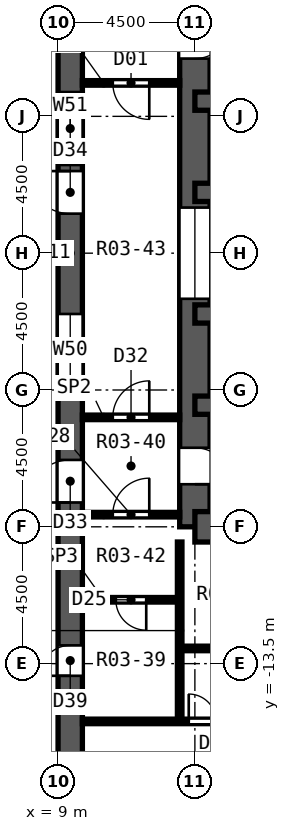
"""IFC4 building model, lengths in metres.
Left out: names, types, materials, properties, quantities, classifications, styles, units other than length and angle.
Written with IfcOpenShell. Run it as: python <this file> out.ifc"""

import sys

from ifc_helpers import new_model, si_unit, direction, frame, frame_2d, origin, place, context, subcontext, project, spatial, rectangle, extrude, element, fill, save


model = new_model("IFC4")
c1 = context("Model", 3, precision=1e-05, world=origin(), true_north=direction((0.0, 1.0)))
c2 = subcontext(c1, "Body", "Model", "MODEL_VIEW")
j1 = project(units=[si_unit("LENGTHUNIT", "METRE"), si_unit("PLANEANGLEUNIT", "RADIAN")], contexts=[c1])
p1 = place(None, origin())
s1 = spatial("IfcSite", under=j1, at=p1, CompositionType="ELEMENT")
p2 = place(p1, origin())
s2 = spatial("IfcBuilding", under=s1, at=p2, CompositionType="ELEMENT")
p3 = place(p2, origin())
s3 = spatial("IfcBuildingStorey", under=s2, at=p3, CompositionType="ELEMENT", Elevation=0.0)
p4 = place(p3, frame((13.5, -9.0, 0.0), z_axis=(0.0, 0.0, 1.0), x_axis=(0.0, 1.0, 0.0)))
e1 = element("IfcWall", 1, at=p4, inside=s3, PredefinedType="SHEAR", context=c2, shape_type="SweptSolid", body=[
    extrude(rectangle(XDim=18.0, YDim=1.0, at=frame_2d((9.0, 0.0))), origin(), (0.0, 0.0, 1.0), 5.0),
])
p5 = place(p4, frame((15.4, 0.0, 0.0)))
e2 = element("IfcOpeningElement", 2, at=p5, cuts=e1, PredefinedType="OPENING", context=c2, shape_type="SweptSolid", body=[
    extrude(rectangle(XDim=1.2, YDim=2.1, at=frame_2d((0.6, 1.05))), frame((0.0, 0.512, 0.0), z_axis=(0.0, -1.0, 0.0), x_axis=(1.0, 0.0, 0.0)), (0.0, 0.0, 1.0), 1.024),
])
p6 = place(p4, frame((1.4, 0.0, 0.0)))
e3 = element("IfcOpeningElement", 3, at=p6, cuts=e1, PredefinedType="OPENING", context=c2, shape_type="SweptSolid", body=[
    extrude(rectangle(XDim=1.2, YDim=2.1, at=frame_2d((0.6, 1.05))), frame((0.0, 0.512, 0.0), z_axis=(0.0, -1.0, 0.0), x_axis=(1.0, 0.0, 0.0)), (0.0, 0.0, 1.0), 1.024),
])
p7 = place(p4, frame((7.5, 0.0, 0.0)))
e4 = element("IfcOpeningElement", 4, at=p7, cuts=e1, PredefinedType="OPENING", context=c2, shape_type="SweptSolid", body=[
    extrude(rectangle(XDim=3.0, YDim=2.4, at=frame_2d((1.5, 1.2))), frame((0.0, 0.512, 0.0), z_axis=(0.0, -1.0, 0.0), x_axis=(1.0, 0.0, 0.0)), (0.0, 0.0, 1.0), 1.024),
])
p8 = place(p3, frame((13.5, -9.0, 0.0), z_axis=(0.0, 0.0, 1.0), x_axis=(1.0, 0.0, 0.0)))
e5 = element("IfcWall", 5, at=p8, inside=s3, PredefinedType="SHEAR", context=c2, shape_type="SweptSolid", body=[
    extrude(rectangle(XDim=12.4, YDim=1.0, at=frame_2d((6.2, 0.0))), origin(), (0.0, 0.0, 1.0), 5.0),
])
p9 = place(p3, frame((13.5, 5.0, 0.0), z_axis=(0.0, 0.0, 1.0), x_axis=(1.0, 0.0, 0.0)))
e6 = element("IfcWall", 6, at=p9, inside=s3, PredefinedType="SHEAR", context=c2, shape_type="SweptSolid", body=[
    extrude(rectangle(XDim=12.4, YDim=0.6, at=frame_2d((6.2, 0.0))), origin(), (0.0, 0.0, 1.0), 5.0),
])
p10 = place(p9, frame((9.74, 0.0, 0.0)))
e7 = element("IfcOpeningElement", 7, at=p10, cuts=e6, PredefinedType="OPENING", context=c2, shape_type="SweptSolid", body=[
    extrude(rectangle(XDim=0.9, YDim=2.1, at=frame_2d((0.45, 1.05))), frame((0.0, 0.312, 0.0), z_axis=(0.0, -1.0, 0.0), x_axis=(1.0, 0.0, 0.0)), (0.0, 0.0, 1.0), 0.624),
])
p11 = place(p3, frame((13.5, -5.0, 0.0), z_axis=(0.0, 0.0, 1.0), x_axis=(1.0, 0.0, 0.0)))
e8 = element("IfcWall", 8, at=p11, inside=s3, PredefinedType="SHEAR", context=c2, shape_type="SweptSolid", body=[
    extrude(rectangle(XDim=12.4, YDim=0.6, at=frame_2d((6.2, 0.0))), origin(), (0.0, 0.0, 1.0), 5.0),
])
p12 = place(p11, frame((9.74, 0.0, 0.0)))
e9 = element("IfcOpeningElement", 9, at=p12, cuts=e8, PredefinedType="OPENING", context=c2, shape_type="SweptSolid", body=[
    extrude(rectangle(XDim=0.9, YDim=2.1, at=frame_2d((0.45, 1.05))), frame((0.0, 0.312, 0.0), z_axis=(0.0, -1.0, 0.0), x_axis=(1.0, 0.0, 0.0)), (0.0, 0.0, 1.0), 0.624),
])
p13 = place(p11, frame((0.6, 0.0, 0.0)))
e10 = element("IfcOpeningElement", 10, at=p13, cuts=e8, PredefinedType="OPENING", context=c2, shape_type="SweptSolid", body=[
    extrude(rectangle(XDim=1.1, YDim=2.1, at=frame_2d((0.55, 1.05))), frame((0.0, 0.312, 0.0), z_axis=(0.0, -1.0, 0.0), x_axis=(1.0, 0.0, 0.0)), (0.0, 0.0, 1.0), 0.624),
])
p14 = place(p3, frame((13.5, 2.0, 0.0), z_axis=(0.0, 0.0, 1.0), x_axis=(1.0, 0.0, 0.0)))
e11 = element("IfcWall", 11, at=p14, inside=s3, PredefinedType="SHEAR", context=c2, shape_type="SweptSolid", body=[
    extrude(rectangle(XDim=12.4, YDim=0.6, at=frame_2d((6.2, 0.0))), origin(), (0.0, 0.0, 1.0), 5.0),
])
p15 = place(p14, frame((7.65, 0.0, 0.0)))
e12 = element("IfcOpeningElement", 12, at=p15, cuts=e11, PredefinedType="OPENING", context=c2, shape_type="SweptSolid", body=[
    extrude(rectangle(XDim=1.1, YDim=2.1, at=frame_2d((0.55, 1.05))), frame((0.0, 0.312, 0.0), z_axis=(0.0, -1.0, 0.0), x_axis=(1.0, 0.0, 0.0)), (0.0, 0.0, 1.0), 0.624),
])
p16 = place(p14, frame((2.341, 0.0, 0.0)))
e13 = element("IfcOpeningElement", 13, at=p16, cuts=e11, PredefinedType="OPENING", context=c2, shape_type="SweptSolid", body=[
    extrude(rectangle(XDim=0.9, YDim=2.1, at=frame_2d((0.45, 1.05))), frame((0.0, 0.312, 0.0), z_axis=(0.0, -1.0, 0.0), x_axis=(1.0, 0.0, 0.0)), (0.0, 0.0, 1.0), 0.624),
])
p17 = place(p14, frame((5.761, 0.0, 0.0)))
e14 = element("IfcOpeningElement", 14, at=p17, cuts=e11, PredefinedType="OPENING", context=c2, shape_type="SweptSolid", body=[
    extrude(rectangle(XDim=0.9, YDim=2.1, at=frame_2d((0.45, 1.05))), frame((0.0, 0.312, 0.0), z_axis=(0.0, -1.0, 0.0), x_axis=(1.0, 0.0, 0.0)), (0.0, 0.0, 1.0), 0.624),
])
p18 = place(p14, frame((9.74, 0.0, 0.0)))
e15 = element("IfcOpeningElement", 15, at=p18, cuts=e11, PredefinedType="OPENING", context=c2, shape_type="SweptSolid", body=[
    extrude(rectangle(XDim=0.9, YDim=2.1, at=frame_2d((0.45, 1.05))), frame((0.0, 0.312, 0.0), z_axis=(0.0, -1.0, 0.0), x_axis=(1.0, 0.0, 0.0)), (0.0, 0.0, 1.0), 0.624),
])
p19 = place(p14, frame((10.88, 0.0, 0.0)))
e16 = element("IfcOpeningElement", 16, at=p19, cuts=e11, PredefinedType="OPENING", context=c2, shape_type="SweptSolid", body=[
    extrude(rectangle(XDim=0.9, YDim=2.1, at=frame_2d((0.45, 1.05))), frame((0.0, 0.312, 0.0), z_axis=(0.0, -1.0, 0.0), x_axis=(1.0, 0.0, 0.0)), (0.0, 0.0, 1.0), 0.624),
])
p20 = place(p3, frame((13.5, -2.0, 0.0), z_axis=(0.0, 0.0, 1.0), x_axis=(1.0, 0.0, 0.0)))
e17 = element("IfcWall", 17, at=p20, inside=s3, PredefinedType="SHEAR", context=c2, shape_type="SweptSolid", body=[
    extrude(rectangle(XDim=12.4, YDim=0.6, at=frame_2d((6.2, 0.0))), origin(), (0.0, 0.0, 1.0), 5.0),
])
p21 = place(p20, frame((5.62, 0.0, 0.0)))
e18 = element("IfcOpeningElement", 18, at=p21, cuts=e17, PredefinedType="OPENING", context=c2, shape_type="SweptSolid", body=[
    extrude(rectangle(XDim=1.1, YDim=2.1, at=frame_2d((0.55, 1.05))), frame((0.0, 0.312, 0.0), z_axis=(0.0, -1.0, 0.0), x_axis=(1.0, 0.0, 0.0)), (0.0, 0.0, 1.0), 0.624),
])
p22 = place(p20, frame((7.65, 0.0, 0.0)))
e19 = element("IfcOpeningElement", 19, at=p22, cuts=e17, PredefinedType="OPENING", context=c2, shape_type="SweptSolid", body=[
    extrude(rectangle(XDim=1.1, YDim=2.1, at=frame_2d((0.55, 1.05))), frame((0.0, 0.312, 0.0), z_axis=(0.0, -1.0, 0.0), x_axis=(1.0, 0.0, 0.0)), (0.0, 0.0, 1.0), 0.624),
])
p23 = place(p20, frame((1.265, 0.0, 0.0)))
e20 = element("IfcOpeningElement", 20, at=p23, cuts=e17, PredefinedType="OPENING", context=c2, shape_type="SweptSolid", body=[
    extrude(rectangle(XDim=1.0, YDim=2.1, at=frame_2d((0.5, 1.05))), frame((0.0, 0.312, 0.0), z_axis=(0.0, -1.0, 0.0), x_axis=(1.0, 0.0, 0.0)), (0.0, 0.0, 1.0), 0.624),
])
p24 = place(p20, frame((9.74, 0.0, 0.0)))
e21 = element("IfcOpeningElement", 21, at=p24, cuts=e17, PredefinedType="OPENING", context=c2, shape_type="SweptSolid", body=[
    extrude(rectangle(XDim=0.9, YDim=2.1, at=frame_2d((0.45, 1.05))), frame((0.0, 0.312, 0.0), z_axis=(0.0, -1.0, 0.0), x_axis=(1.0, 0.0, 0.0)), (0.0, 0.0, 1.0), 0.624),
])
p25 = place(p20, frame((10.88, 0.0, 0.0)))
e22 = element("IfcOpeningElement", 22, at=p25, cuts=e17, PredefinedType="OPENING", context=c2, shape_type="SweptSolid", body=[
    extrude(rectangle(XDim=0.9, YDim=2.1, at=frame_2d((0.45, 1.05))), frame((0.0, 0.312, 0.0), z_axis=(0.0, -1.0, 0.0), x_axis=(1.0, 0.0, 0.0)), (0.0, 0.0, 1.0), 0.624),
])
p26 = place(p3, frame((9.4, -27.077, 0.0), z_axis=(0.0, 0.0, 1.0), x_axis=(0.0, 1.0, 0.0)))
e23 = element("IfcWall", 23, at=p26, inside=s3, PredefinedType="SHEAR", context=c2, shape_type="SweptSolid", body=[
    extrude(rectangle(XDim=54.154, YDim=0.8, at=frame_2d((27.077, 0.0))), origin(), (0.0, 0.0, 1.0), 5.0),
])
p27 = place(p26, frame((18.877, 0.0, 0.0)))
e24 = element("IfcOpeningElement", 24, at=p27, cuts=e23, PredefinedType="OPENING", context=c2, shape_type="SweptSolid", body=[
    extrude(rectangle(XDim=1.4, YDim=2.1, at=frame_2d((0.7, 1.05))), frame((0.0, 0.412, 0.0), z_axis=(0.0, -1.0, 0.0), x_axis=(1.0, 0.0, 0.0)), (0.0, 0.0, 1.0), 0.824),
])
p28 = place(p26, frame((22.677, 0.0, 0.3)))
e25 = element("IfcOpeningElement", 25, at=p28, cuts=e23, PredefinedType="OPENING", context=c2, shape_type="SweptSolid", body=[
    extrude(rectangle(XDim=2.4, YDim=2.1, at=frame_2d((1.2, 1.05))), frame((0.0, 0.412, 0.0), z_axis=(0.0, -1.0, 0.0), x_axis=(1.0, 0.0, 0.0)), (0.0, 0.0, 1.0), 0.824),
])
p29 = place(p26, frame((28.377, 0.0, 0.0)))
e26 = element("IfcOpeningElement", 26, at=p29, cuts=e23, PredefinedType="OPENING", context=c2, shape_type="SweptSolid", body=[
    extrude(rectangle(XDim=1.4, YDim=2.1, at=frame_2d((0.7, 1.05))), frame((0.0, 0.412, 0.0), z_axis=(0.0, -1.0, 0.0), x_axis=(1.0, 0.0, 0.0)), (0.0, 0.0, 1.0), 0.824),
])
p30 = place(p26, frame((29.977, 0.0, 0.3)))
e27 = element("IfcOpeningElement", 27, at=p30, cuts=e23, PredefinedType="OPENING", context=c2, shape_type="SweptSolid", body=[
    extrude(rectangle(XDim=2.4, YDim=2.1, at=frame_2d((1.2, 1.05))), frame((0.0, 0.412, 0.0), z_axis=(0.0, -1.0, 0.0), x_axis=(1.0, 0.0, 0.0)), (0.0, 0.0, 1.0), 0.824),
])
p31 = place(p26, frame((35.377, 0.0, 0.0)))
e28 = element("IfcOpeningElement", 28, at=p31, cuts=e23, PredefinedType="OPENING", context=c2, shape_type="SweptSolid", body=[
    extrude(rectangle(XDim=1.4, YDim=2.1, at=frame_2d((0.7, 1.05))), frame((0.0, 0.412, 0.0), z_axis=(0.0, -1.0, 0.0), x_axis=(1.0, 0.0, 0.0)), (0.0, 0.0, 1.0), 0.824),
])
p32 = place(p26, frame((38.477, 0.0, 0.3)))
e29 = element("IfcOpeningElement", 29, at=p32, cuts=e23, PredefinedType="OPENING", context=c2, shape_type="SweptSolid", body=[
    extrude(rectangle(XDim=2.4, YDim=2.1, at=frame_2d((1.2, 1.05))), frame((0.0, 0.412, 0.0), z_axis=(0.0, -1.0, 0.0), x_axis=(1.0, 0.0, 0.0)), (0.0, 0.0, 1.0), 0.824),
])
p33 = place(p26, frame((13.177, 0.0, 0.0)))
e30 = element("IfcOpeningElement", 30, at=p33, cuts=e23, PredefinedType="OPENING", context=c2, shape_type="SweptSolid", body=[
    extrude(rectangle(XDim=1.0, YDim=2.1, at=frame_2d((0.5, 1.05))), frame((0.0, 0.412, 0.0), z_axis=(0.0, -1.0, 0.0), x_axis=(1.0, 0.0, 0.0)), (0.0, 0.0, 1.0), 0.824),
])
p34 = place(p3, frame((9.8, -15.4, 0.0), z_axis=(0.0, 0.0, 1.0), x_axis=(1.0, 0.0, 0.0)))
e31 = element("IfcWall", 31, at=p34, inside=s3, PredefinedType="PARTITIONING", context=c2, shape_type="SweptSolid", body=[
    extrude(rectangle(XDim=13.975, YDim=0.15, at=frame_2d((6.987, 0.0))), origin(), (0.0, 0.0, 1.0), 4.45),
])
p35 = place(p34, frame((3.498, 0.0, 0.0)))
e32 = element("IfcOpeningElement", 32, at=p35, cuts=e31, PredefinedType="OPENING", context=c2, shape_type="SweptSolid", body=[
    extrude(rectangle(XDim=1.8, YDim=2.1, at=frame_2d((0.9, 1.05))), frame((0.0, 0.087, 0.0), z_axis=(0.0, -1.0, 0.0), x_axis=(1.0, 0.0, 0.0)), (0.0, 0.0, 1.0), 0.174),
])
p36 = place(p34, frame((9.289, 0.0, 0.0)))
e33 = element("IfcOpeningElement", 33, at=p36, cuts=e31, PredefinedType="OPENING", context=c2, shape_type="SweptSolid", body=[
    extrude(rectangle(XDim=1.0, YDim=2.1, at=frame_2d((0.5, 1.05))), frame((0.0, 0.087, 0.0), z_axis=(0.0, -1.0, 0.0), x_axis=(1.0, 0.0, 0.0)), (0.0, 0.0, 1.0), 0.174),
])
p37 = place(p3, frame((13.075, -13.0, 0.0), z_axis=(0.0, 0.0, 1.0), x_axis=(1.0, 0.0, 0.0)))
e34 = element("IfcWall", 34, at=p37, inside=s3, PredefinedType="PARTITIONING", context=c2, shape_type="SweptSolid", body=[
    extrude(rectangle(XDim=12.085, YDim=0.15, at=frame_2d((6.042, 0.0))), origin(), (0.0, 0.0, 1.0), 4.45),
])
p38 = place(p37, frame((1.175, 0.0, 0.0)))
e35 = element("IfcOpeningElement", 35, at=p38, cuts=e34, PredefinedType="OPENING", context=c2, shape_type="SweptSolid", body=[
    extrude(rectangle(XDim=0.9, YDim=2.1, at=frame_2d((0.45, 1.05))), frame((0.0, 0.087, 0.0), z_axis=(0.0, -1.0, 0.0), x_axis=(1.0, 0.0, 0.0)), (0.0, 0.0, 1.0), 0.174),
])
p39 = place(p37, frame((4.475, 0.0, 0.0)))
e36 = element("IfcOpeningElement", 36, at=p39, cuts=e34, PredefinedType="OPENING", context=c2, shape_type="SweptSolid", body=[
    extrude(rectangle(XDim=0.9, YDim=2.1, at=frame_2d((0.45, 1.05))), frame((0.0, 0.087, 0.0), z_axis=(0.0, -1.0, 0.0), x_axis=(1.0, 0.0, 0.0)), (0.0, 0.0, 1.0), 0.174),
])
p40 = place(p37, frame((7.375, 0.0, 0.0)))
e37 = element("IfcOpeningElement", 37, at=p40, cuts=e34, PredefinedType="OPENING", context=c2, shape_type="SweptSolid", body=[
    extrude(rectangle(XDim=0.9, YDim=2.1, at=frame_2d((0.45, 1.05))), frame((0.0, 0.087, 0.0), z_axis=(0.0, -1.0, 0.0), x_axis=(1.0, 0.0, 0.0)), (0.0, 0.0, 1.0), 0.174),
])
p41 = place(p37, frame((10.155, 0.0, 0.0)))
e38 = element("IfcOpeningElement", 38, at=p41, cuts=e34, PredefinedType="OPENING", context=c2, shape_type="SweptSolid", body=[
    extrude(rectangle(XDim=0.9, YDim=2.1, at=frame_2d((0.45, 1.05))), frame((0.0, 0.087, 0.0), z_axis=(0.0, -1.0, 0.0), x_axis=(1.0, 0.0, 0.0)), (0.0, 0.0, 1.0), 0.174),
])
p42 = place(p3, frame((9.8, -11.4, 0.0), z_axis=(0.0, 0.0, 1.0), x_axis=(1.0, 0.0, 0.0)))
e39 = element("IfcWall", 39, at=p42, inside=s3, PredefinedType="PARTITIONING", context=c2, shape_type="SweptSolid", body=[
    extrude(rectangle(XDim=3.125, YDim=0.15, at=frame_2d((1.562, 0.0))), origin(), (0.0, 0.0, 1.0), 4.45),
])
p43 = place(p42, frame((1.1, 0.0, 0.0)))
e40 = element("IfcOpeningElement", 40, at=p43, cuts=e39, PredefinedType="OPENING", context=c2, shape_type="SweptSolid", body=[
    extrude(rectangle(XDim=1.0, YDim=2.1, at=frame_2d((0.5, 1.05))), frame((0.0, 0.087, 0.0), z_axis=(0.0, -1.0, 0.0), x_axis=(1.0, 0.0, 0.0)), (0.0, 0.0, 1.0), 0.174),
])
p44 = place(p3, frame((9.8, -8.6, 0.0), z_axis=(0.0, 0.0, 1.0), x_axis=(1.0, 0.0, 0.0)))
e41 = element("IfcWall", 41, at=p44, inside=s3, PredefinedType="PARTITIONING", context=c2, shape_type="SweptSolid", body=[
    extrude(rectangle(XDim=3.2, YDim=0.15, at=frame_2d((1.6, 0.0))), origin(), (0.0, 0.0, 1.0), 4.45),
])
p45 = place(p44, frame((1.0, 0.0, 0.0)))
e42 = element("IfcOpeningElement", 42, at=p45, cuts=e41, PredefinedType="OPENING", context=c2, shape_type="SweptSolid", body=[
    extrude(rectangle(XDim=1.2, YDim=2.1, at=frame_2d((0.6, 1.05))), frame((0.0, 0.087, 0.0), z_axis=(0.0, -1.0, 0.0), x_axis=(1.0, 0.0, 0.0)), (0.0, 0.0, 1.0), 0.174),
])
p46 = place(p3, frame((9.8, -5.4, 0.0), z_axis=(0.0, 0.0, 1.0), x_axis=(1.0, 0.0, 0.0)))
e43 = element("IfcWall", 43, at=p46, inside=s3, PredefinedType="PARTITIONING", context=c2, shape_type="SweptSolid", body=[
    extrude(rectangle(XDim=3.2, YDim=0.15, at=frame_2d((1.6, 0.0))), origin(), (0.0, 0.0, 1.0), 4.45),
])
p47 = place(p46, frame((1.0, 0.0, 0.0)))
e44 = element("IfcOpeningElement", 44, at=p47, cuts=e43, PredefinedType="OPENING", context=c2, shape_type="SweptSolid", body=[
    extrude(rectangle(XDim=1.2, YDim=2.1, at=frame_2d((0.6, 1.05))), frame((0.0, 0.087, 0.0), z_axis=(0.0, -1.0, 0.0), x_axis=(1.0, 0.0, 0.0)), (0.0, 0.0, 1.0), 0.174),
])
p48 = place(p3, frame((9.8, 5.6, 0.0), z_axis=(0.0, 0.0, 1.0), x_axis=(1.0, 0.0, 0.0)))
e45 = element("IfcWall", 45, at=p48, inside=s3, PredefinedType="PARTITIONING", context=c2, shape_type="SweptSolid", body=[
    extrude(rectangle(XDim=3.2, YDim=0.15, at=frame_2d((1.6, 0.0))), origin(), (0.0, 0.0, 1.0), 4.45),
])
p49 = place(p48, frame((1.0, 0.0, 0.0)))
e46 = element("IfcOpeningElement", 46, at=p49, cuts=e45, PredefinedType="OPENING", context=c2, shape_type="SweptSolid", body=[
    extrude(rectangle(XDim=1.2, YDim=2.1, at=frame_2d((0.6, 1.05))), frame((0.0, 0.087, 0.0), z_axis=(0.0, -1.0, 0.0), x_axis=(1.0, 0.0, 0.0)), (0.0, 0.0, 1.0), 0.174),
])
p50 = place(p3, frame((13.0, -15.325, 0.0), z_axis=(0.0, 0.0, 1.0), x_axis=(0.0, 1.0, 0.0)))
e47 = element("IfcWall", 47, at=p50, inside=s3, PredefinedType="PARTITIONING", context=c2, shape_type="SweptSolid", body=[
    extrude(rectangle(XDim=5.825, YDim=0.15, at=frame_2d((2.913, 0.0))), origin(), (0.0, 0.0, 1.0), 4.45),
])
p51 = place(p49, frame((1.2, 0.0, 0.0), z_axis=(0.0, 0.0, 1.0), x_axis=(-1.0, 0.0, 0.0)))
e48 = element("IfcDoor", 48, at=p51, inside=s3, OperationType="SINGLE_SWING_LEFT", PredefinedType="DOOR", context=c2, shape_type="SweptSolid", body=[
    extrude(rectangle(XDim=1.2, YDim=2.1, at=frame_2d((0.6, 1.05))), frame((0.0, 0.025, 0.0), z_axis=(0.0, -1.0, 0.0), x_axis=(1.0, 0.0, 0.0)), (0.0, 0.0, 1.0), 0.05),
])
fill(e46, e48)
p52 = place(p35, origin())
e49 = element("IfcDoor", 49, at=p52, inside=s3, OperationType="DOUBLE_DOOR_SINGLE_SWING", PredefinedType="DOOR", context=c2, shape_type="SweptSolid", body=[
    extrude(rectangle(XDim=1.8, YDim=2.1, at=frame_2d((0.9, 1.05))), frame((0.0, 0.025, 0.0), z_axis=(0.0, -1.0, 0.0), x_axis=(1.0, 0.0, 0.0)), (0.0, 0.0, 1.0), 0.05),
])
fill(e32, e49)
p53 = place(p43, frame((1.0, 0.0, 0.0), z_axis=(0.0, 0.0, 1.0), x_axis=(-1.0, 0.0, 0.0)))
e50 = element("IfcDoor", 50, at=p53, inside=s3, OperationType="SINGLE_SWING_LEFT", PredefinedType="DOOR", context=c2, shape_type="SweptSolid", body=[
    extrude(rectangle(XDim=1.0, YDim=2.1, at=frame_2d((0.5, 1.05))), frame((0.0, 0.025, 0.0), z_axis=(0.0, -1.0, 0.0), x_axis=(1.0, 0.0, 0.0)), (0.0, 0.0, 1.0), 0.05),
])
fill(e40, e50)
p54 = place(p45, origin())
e51 = element("IfcDoor", 51, at=p54, inside=s3, OperationType="SINGLE_SWING_RIGHT", PredefinedType="DOOR", context=c2, shape_type="SweptSolid", body=[
    extrude(rectangle(XDim=1.2, YDim=2.1, at=frame_2d((0.6, 1.05))), frame((0.0, 0.025, 0.0), z_axis=(0.0, -1.0, 0.0), x_axis=(1.0, 0.0, 0.0)), (0.0, 0.0, 1.0), 0.05),
])
fill(e42, e51)
p55 = place(p47, origin())
e52 = element("IfcDoor", 52, at=p55, inside=s3, OperationType="SINGLE_SWING_RIGHT", PredefinedType="DOOR", context=c2, shape_type="SweptSolid", body=[
    extrude(rectangle(XDim=1.2, YDim=2.1, at=frame_2d((0.6, 1.05))), frame((0.0, 0.025, 0.0), z_axis=(0.0, -1.0, 0.0), x_axis=(1.0, 0.0, 0.0)), (0.0, 0.0, 1.0), 0.05),
])
fill(e44, e52)
p56 = place(p27, origin())
e53 = element("IfcDoor", 53, at=p56, inside=s3, OperationType="SINGLE_SWING_LEFT", PredefinedType="DOOR", context=c2, shape_type="SweptSolid", body=[
    extrude(rectangle(XDim=1.4, YDim=2.1, at=frame_2d((0.7, 1.05))), frame((0.0, 0.025, 0.0), z_axis=(0.0, -1.0, 0.0), x_axis=(1.0, 0.0, 0.0)), (0.0, 0.0, 1.0), 0.05),
])
fill(e24, e53)
p57 = place(p28, origin())
e54 = element("IfcWindow", 54, at=p57, inside=s3, PartitioningType="SINGLE_PANEL", PredefinedType="WINDOW", context=c2, shape_type="SweptSolid", body=[
    extrude(rectangle(XDim=2.4, YDim=2.1, at=frame_2d((1.2, 1.05))), frame((0.0, 0.03, 0.0), z_axis=(0.0, -1.0, 0.0), x_axis=(1.0, 0.0, 0.0)), (0.0, 0.0, 1.0), 0.06),
])
fill(e25, e54)
p58 = place(p29, origin())
e55 = element("IfcDoor", 55, at=p58, inside=s3, OperationType="SINGLE_SWING_RIGHT", PredefinedType="DOOR", context=c2, shape_type="SweptSolid", body=[
    extrude(rectangle(XDim=1.4, YDim=2.1, at=frame_2d((0.7, 1.05))), frame((0.0, 0.025, 0.0), z_axis=(0.0, -1.0, 0.0), x_axis=(1.0, 0.0, 0.0)), (0.0, 0.0, 1.0), 0.05),
])
fill(e26, e55)
p59 = place(p30, origin())
e56 = element("IfcWindow", 56, at=p59, inside=s3, PartitioningType="SINGLE_PANEL", PredefinedType="WINDOW", context=c2, shape_type="SweptSolid", body=[
    extrude(rectangle(XDim=2.4, YDim=2.1, at=frame_2d((1.2, 1.05))), frame((0.0, 0.03, 0.0), z_axis=(0.0, -1.0, 0.0), x_axis=(1.0, 0.0, 0.0)), (0.0, 0.0, 1.0), 0.06),
])
fill(e27, e56)
p60 = place(p33, origin())
e57 = element("IfcDoor", 57, at=p60, inside=s3, OperationType="SINGLE_SWING_LEFT", PredefinedType="DOOR", context=c2, shape_type="SweptSolid", body=[
    extrude(rectangle(XDim=1.0, YDim=2.1, at=frame_2d((0.5, 1.05))), frame((0.0, 0.025, 0.0), z_axis=(0.0, -1.0, 0.0), x_axis=(1.0, 0.0, 0.0)), (0.0, 0.0, 1.0), 0.05),
])
fill(e30, e57)
p61 = place(p5, frame((1.2, 0.0, 0.0), z_axis=(0.0, 0.0, 1.0), x_axis=(-1.0, 0.0, 0.0)))
e58 = element("IfcDoor", 58, at=p61, inside=s3, OperationType="SINGLE_SWING_LEFT", PredefinedType="DOOR", context=c2, shape_type="SweptSolid", body=[
    extrude(rectangle(XDim=1.2, YDim=2.1, at=frame_2d((0.6, 1.05))), frame((0.0, 0.025, 0.0), z_axis=(0.0, -1.0, 0.0), x_axis=(1.0, 0.0, 0.0)), (0.0, 0.0, 1.0), 0.05),
])
fill(e2, e58)
p62 = place(p6, frame((1.2, 0.0, 0.0), z_axis=(0.0, 0.0, 1.0), x_axis=(-1.0, 0.0, 0.0)))
e59 = element("IfcDoor", 59, at=p62, inside=s3, OperationType="SINGLE_SWING_RIGHT", PredefinedType="DOOR", context=c2, shape_type="SweptSolid", body=[
    extrude(rectangle(XDim=1.2, YDim=2.1, at=frame_2d((0.6, 1.05))), frame((0.0, 0.025, 0.0), z_axis=(0.0, -1.0, 0.0), x_axis=(1.0, 0.0, 0.0)), (0.0, 0.0, 1.0), 0.05),
])
fill(e3, e59)
p63 = place(p7, origin())
e60 = element("IfcDoor", 60, at=p63, inside=s3, OperationType="DOUBLE_DOOR_SLIDING", PredefinedType="DOOR", context=c2, shape_type="SweptSolid", body=[
    extrude(rectangle(XDim=3.0, YDim=2.4, at=frame_2d((1.5, 1.2))), frame((0.0, 0.025, 0.0), z_axis=(0.0, -1.0, 0.0), x_axis=(1.0, 0.0, 0.0)), (0.0, 0.0, 1.0), 0.05),
])
fill(e4, e60)
save(model, sys.argv[1])
